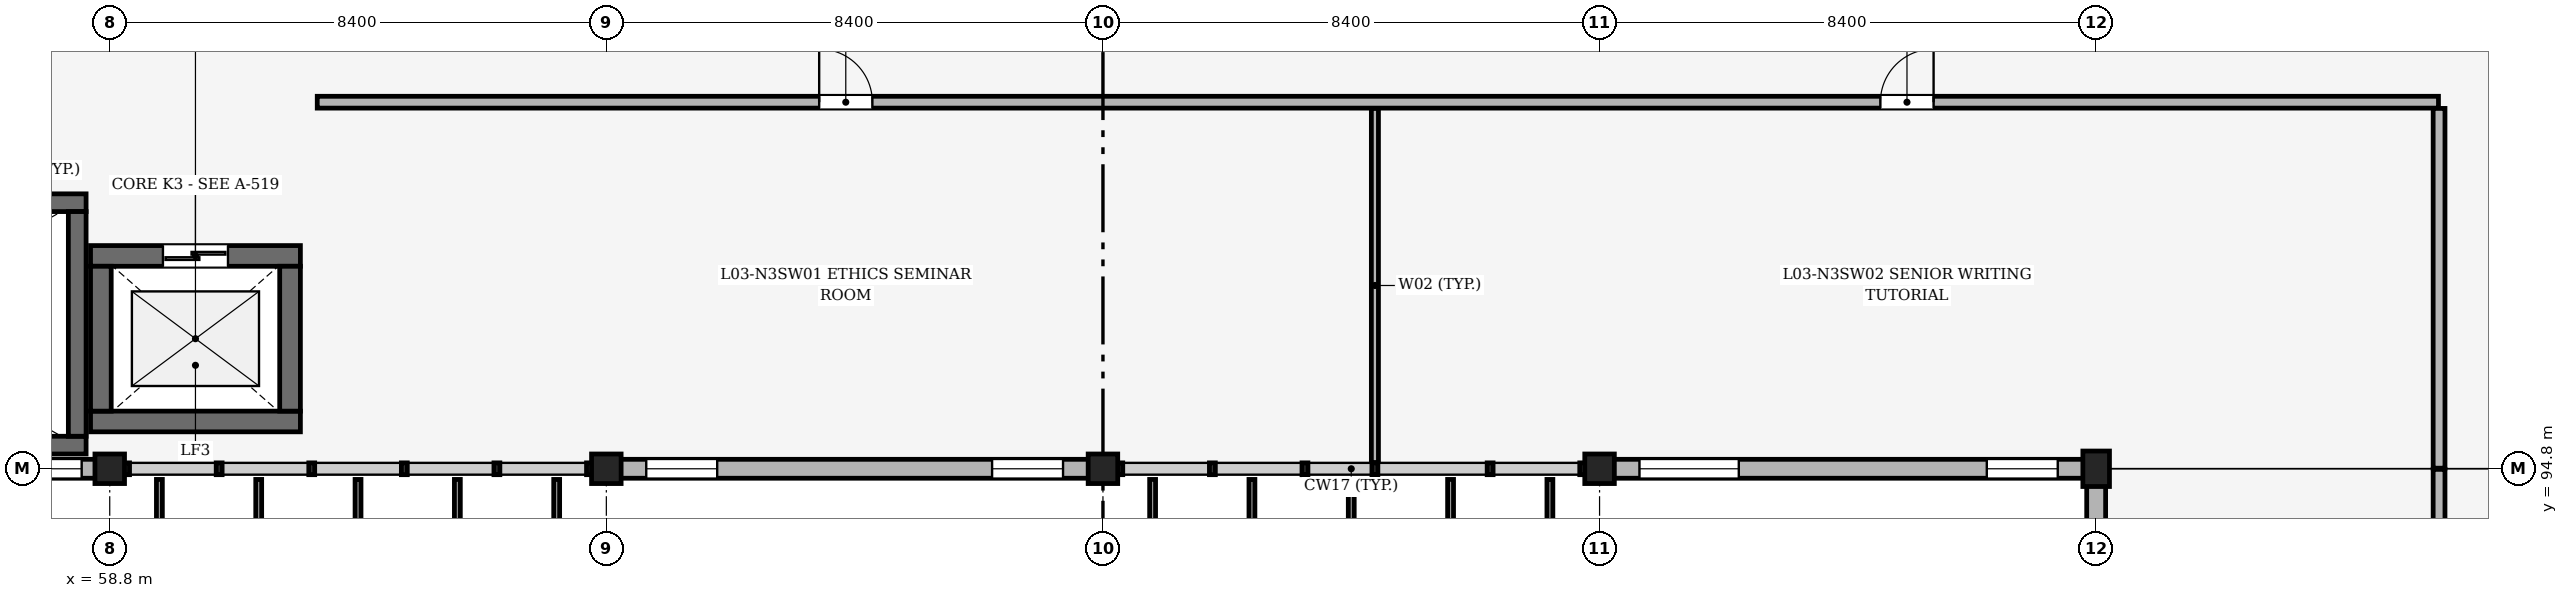
"""IFC4 building model, lengths in metres.
Left out: names, types, materials, properties, quantities, classifications, styles, units other than length and angle.
Written with IfcOpenShell. Run it as: python <this file> out.ifc"""

import sys

from ifc_helpers import new_model, si_unit, direction, frame, frame_2d, origin, origin_2d, place, context, subcontext, project, spatial, rectangle, extrude, element, fill, save


model = new_model("IFC4")
c1 = context("Model", 3, precision=1e-05, world=origin(), true_north=direction((0.0, 1.0)))
c2 = subcontext(c1, "Body", "Model", "MODEL_VIEW")
j1 = project(units=[si_unit("LENGTHUNIT", "METRE"), si_unit("PLANEANGLEUNIT", "RADIAN")], contexts=[c1])
p1 = place(None, origin())
s1 = spatial("IfcSite", under=j1, at=p1, CompositionType="ELEMENT")
p2 = place(p1, origin())
s2 = spatial("IfcBuilding", under=s1, at=p2, CompositionType="ELEMENT")
p3 = place(p2, frame((0.0, 0.0, 13.2)))
s3 = spatial("IfcBuildingStorey", under=s2, at=p3, CompositionType="ELEMENT", Elevation=13.2)
for number, where, z_axis, x_axis in (
    (1, (58.8, 94.8, 0.0), (0.0, 0.0, 1.0), (1.0, 0.0, 0.0)),
    (2, (67.2, 94.8, 0.0), (0.0, 0.0, 1.0), (1.0, 0.0, 0.0)),
    (3, (75.6, 94.8, 0.0), (0.0, 0.0, 1.0), (1.0, 0.0, 0.0)),
    (4, (84.0, 94.8, 0.0), (0.0, 0.0, 1.0), (1.0, 0.0, 0.0)),
):
    element("IfcColumn", number, at=place(p3, frame(where, z_axis=z_axis, x_axis=x_axis)), inside=s3, PredefinedType="COLUMN", context=c2, shape_type="SweptSolid", body=[
        extrude(rectangle(XDim=0.5, YDim=0.5, at=origin_2d()), origin(), (0.0, 0.0, 1.0), 4.2),
    ])
p4 = place(p3, frame((92.4, 94.8, 0.0), z_axis=(0.0, 0.0, 1.0), x_axis=(1.0, 0.0, 0.0)))
e5 = element("IfcColumn", 5, at=p4, inside=s3, PredefinedType="COLUMN", context=c2, shape_type="SweptSolid", body=[
    extrude(rectangle(XDim=0.45, YDim=0.6, at=origin_2d()), origin(), (0.0, 0.0, 1.0), 4.2),
])
p5 = place(p3, frame((50.625, 94.8, 0.0), z_axis=(0.0, 0.0, 1.0), x_axis=(1.0, 0.0, 0.0)))
e6 = element("IfcWall", 6, at=p5, inside=s3, PredefinedType="SOLIDWALL", context=c2, shape_type="SweptSolid", body=[
    extrude(rectangle(XDim=7.95, YDim=0.32, at=frame_2d((3.975, 0.0))), origin(), (0.0, 0.0, 1.0), 3.06),
])
p6 = place(p5, frame((0.45, 0.0, 0.9)))
e7 = element("IfcOpeningElement", 7, at=p6, cuts=e6, PredefinedType="OPENING", context=c2, shape_type="SweptSolid", body=[
    extrude(rectangle(XDim=1.2, YDim=1.8, at=frame_2d((0.6, 0.9))), frame((0.0, 0.17, 0.0), z_axis=(0.0, -1.0, 0.0), x_axis=(1.0, 0.0, 0.0)), (0.0, 0.0, 1.0), 0.34),
])
p7 = place(p5, frame((6.02, 0.0, 0.9)))
e8 = element("IfcOpeningElement", 8, at=p7, cuts=e6, PredefinedType="OPENING", context=c2, shape_type="SweptSolid", body=[
    extrude(rectangle(XDim=1.68, YDim=2.01, at=frame_2d((0.84, 1.005))), frame((0.0, 0.17, 0.0), z_axis=(0.0, -1.0, 0.0), x_axis=(1.0, 0.0, 0.0)), (0.0, 0.0, 1.0), 0.34),
])
p8 = place(p3, frame((67.425, 94.8, 0.0), z_axis=(0.0, 0.0, 1.0), x_axis=(1.0, 0.0, 0.0)))
e9 = element("IfcWall", 9, at=p8, inside=s3, PredefinedType="SOLIDWALL", context=c2, shape_type="SweptSolid", body=[
    extrude(rectangle(XDim=7.95, YDim=0.32, at=frame_2d((3.975, 0.0))), origin(), (0.0, 0.0, 1.0), 3.01),
])
p9 = place(p8, frame((0.45, 0.0, 0.9)))
e10 = element("IfcOpeningElement", 10, at=p9, cuts=e9, PredefinedType="OPENING", context=c2, shape_type="SweptSolid", body=[
    extrude(rectangle(XDim=1.2, YDim=1.5, at=frame_2d((0.6, 0.75))), frame((0.0, 0.17, 0.0), z_axis=(0.0, -1.0, 0.0), x_axis=(1.0, 0.0, 0.0)), (0.0, 0.0, 1.0), 0.34),
])
p10 = place(p8, frame((6.3, 0.0, 0.9)))
e11 = element("IfcOpeningElement", 11, at=p10, cuts=e9, PredefinedType="OPENING", context=c2, shape_type="SweptSolid", body=[
    extrude(rectangle(XDim=1.2, YDim=1.8, at=frame_2d((0.6, 0.9))), frame((0.0, 0.17, 0.0), z_axis=(0.0, -1.0, 0.0), x_axis=(1.0, 0.0, 0.0)), (0.0, 0.0, 1.0), 0.34),
])
p11 = place(p3, frame((84.225, 94.8, 0.0), z_axis=(0.0, 0.0, 1.0), x_axis=(1.0, 0.0, 0.0)))
e12 = element("IfcWall", 12, at=p11, inside=s3, PredefinedType="SOLIDWALL", context=c2, shape_type="SweptSolid", body=[
    extrude(rectangle(XDim=7.975, YDim=0.32, at=frame_2d((3.987, 0.0))), origin(), (0.0, 0.0, 1.0), 3.48),
])
p12 = place(p11, frame((0.45, 0.0, 0.9)))
e13 = element("IfcOpeningElement", 13, at=p12, cuts=e12, PredefinedType="OPENING", context=c2, shape_type="SweptSolid", body=[
    extrude(rectangle(XDim=1.68, YDim=2.4, at=frame_2d((0.84, 1.2))), frame((0.0, 0.17, 0.0), z_axis=(0.0, -1.0, 0.0), x_axis=(1.0, 0.0, 0.0)), (0.0, 0.0, 1.0), 0.34),
])
p13 = place(p11, frame((6.325, 0.0, 0.9)))
e14 = element("IfcOpeningElement", 14, at=p13, cuts=e12, PredefinedType="OPENING", context=c2, shape_type="SweptSolid", body=[
    extrude(rectangle(XDim=1.2, YDim=1.5, at=frame_2d((0.6, 0.75))), frame((0.0, 0.17, 0.0), z_axis=(0.0, -1.0, 0.0), x_axis=(1.0, 0.0, 0.0)), (0.0, 0.0, 1.0), 0.34),
])
p14 = place(p3, frame((92.4, 86.075, 0.0), z_axis=(0.0, 0.0, 1.0), x_axis=(0.0, 1.0, 0.0)))
e15 = element("IfcWall", 15, at=p14, inside=s3, PredefinedType="SOLIDWALL", context=c2, shape_type="SweptSolid", body=[
    extrude(rectangle(XDim=8.45, YDim=0.32, at=frame_2d((4.225, 0.0))), origin(), (0.0, 0.0, 1.0), 3.48),
])
p15 = place(p14, frame((3.025, 0.0, 0.9)))
e16 = element("IfcOpeningElement", 16, at=p15, cuts=e15, PredefinedType="OPENING", context=c2, shape_type="SweptSolid", body=[
    extrude(rectangle(XDim=2.4, YDim=1.8, at=frame_2d((1.2, 0.9))), frame((0.0, 0.17, 0.0), z_axis=(0.0, -1.0, 0.0), x_axis=(1.0, 0.0, 0.0)), (0.0, 0.0, 1.0), 0.34),
])
for number, where, z_axis, x_axis in (
    (17, (50.8, 95.2, 0.0), (0.0, 0.0, 1.0), (1.0, 0.0, 0.0)),
    (18, (50.8, 99.3, 0.0), (0.0, 0.0, 1.0), (1.0, 0.0, 0.0)),
):
    element("IfcWall", number, at=place(p3, frame(where, z_axis=z_axis, x_axis=x_axis)), inside=s3, PredefinedType="SHEAR", context=c2, shape_type="SweptSolid", body=[
        extrude(rectangle(XDim=7.6, YDim=0.3, at=frame_2d((3.8, 0.0))), origin(), (0.0, 0.0, 1.0), 4.025),
    ])
p16 = place(p3, frame((58.25, 95.35, 0.0), z_axis=(0.0, 0.0, 1.0), x_axis=(0.0, 1.0, 0.0)))
e19 = element("IfcWall", 19, at=p16, inside=s3, PredefinedType="SHEAR", context=c2, shape_type="SweptSolid", body=[
    extrude(rectangle(XDim=3.8, YDim=0.3, at=frame_2d((1.9, 0.0))), origin(), (0.0, 0.0, 1.0), 4.025),
])
p17 = place(p3, frame((58.475, 95.6, 0.0), z_axis=(0.0, 0.0, 1.0), x_axis=(1.0, 0.0, 0.0)))
e20 = element("IfcWall", 20, at=p17, inside=s3, PredefinedType="SHEAR", context=c2, shape_type="SweptSolid", body=[
    extrude(rectangle(XDim=3.55, YDim=0.35, at=frame_2d((1.775, 0.0))), origin(), (0.0, 0.0, 1.0), 3.92),
])
p18 = place(p3, frame((58.475, 98.4, 0.0), z_axis=(0.0, 0.0, 1.0), x_axis=(1.0, 0.0, 0.0)))
e21 = element("IfcWall", 21, at=p18, inside=s3, PredefinedType="SHEAR", context=c2, shape_type="SweptSolid", body=[
    extrude(rectangle(XDim=3.55, YDim=0.35, at=frame_2d((1.775, 0.0))), origin(), (0.0, 0.0, 1.0), 3.92),
])
p19 = place(p18, frame((1.225, 0.0, 0.0)))
e22 = element("IfcOpeningElement", 22, at=p19, cuts=e21, PredefinedType="OPENING", context=c2, shape_type="SweptSolid", body=[
    extrude(rectangle(XDim=1.1, YDim=2.2, at=frame_2d((0.55, 1.1))), frame((0.0, 0.185, 0.0), z_axis=(0.0, -1.0, 0.0), x_axis=(1.0, 0.0, 0.0)), (0.0, 0.0, 1.0), 0.37),
])
for number, where, z_axis, x_axis in (
    (23, (58.65, 95.775, 0.0), (0.0, 0.0, 1.0), (0.0, 1.0, 0.0)),
    (24, (61.85, 95.775, 0.0), (0.0, 0.0, 1.0), (0.0, 1.0, 0.0)),
):
    element("IfcWall", number, at=place(p3, frame(where, z_axis=z_axis, x_axis=x_axis)), inside=s3, PredefinedType="SHEAR", context=c2, shape_type="SweptSolid", body=[
        extrude(rectangle(XDim=2.45, YDim=0.35, at=frame_2d((1.225, 0.0))), origin(), (0.0, 0.0, 1.0), 3.92),
    ])
p20 = place(p3, frame((80.2, 94.905, 0.0), z_axis=(0.0, 0.0, 1.0), x_axis=(0.0, 1.0, 0.0)))
e25 = element("IfcWall", 25, at=p20, inside=s3, PredefinedType="PARTITIONING", context=c2, shape_type="SweptSolid", body=[
    extrude(rectangle(XDim=5.99, YDim=0.12, at=frame_2d((2.995, 0.0))), origin(), (0.0, 0.0, 1.0), 3.9),
])
p21 = place(p3, frame((62.31, 101.0, 0.0), z_axis=(0.0, 0.0, 1.0), x_axis=(1.0, 0.0, 0.0)))
e26 = element("IfcWall", 26, at=p21, inside=s3, PredefinedType="PARTITIONING", context=c2, shape_type="SweptSolid", body=[
    extrude(rectangle(XDim=35.88, YDim=0.2, at=frame_2d((17.94, 0.0))), origin(), (0.0, 0.0, 1.0), 3.451),
])
p22 = place(p21, frame((8.49, 0.0, 0.0)))
e27 = element("IfcOpeningElement", 27, at=p22, cuts=e26, PredefinedType="OPENING", context=c2, shape_type="SweptSolid", body=[
    extrude(rectangle(XDim=0.9, YDim=2.1, at=frame_2d((0.45, 1.05))), frame((0.0, 0.11, 0.0), z_axis=(0.0, -1.0, 0.0), x_axis=(1.0, 0.0, 0.0)), (0.0, 0.0, 1.0), 0.22),
])
p23 = place(p21, frame((26.44, 0.0, 0.0)))
e28 = element("IfcOpeningElement", 28, at=p23, cuts=e26, PredefinedType="OPENING", context=c2, shape_type="SweptSolid", body=[
    extrude(rectangle(XDim=0.9, YDim=2.1, at=frame_2d((0.45, 1.05))), frame((0.0, 0.11, 0.0), z_axis=(0.0, -1.0, 0.0), x_axis=(1.0, 0.0, 0.0)), (0.0, 0.0, 1.0), 0.22),
])
p24 = place(p3, frame((98.2, 94.81, 0.0), z_axis=(0.0, 0.0, 1.0), x_axis=(0.0, 1.0, 0.0)))
e29 = element("IfcWall", 29, at=p24, inside=s3, PredefinedType="PARTITIONING", context=c2, shape_type="SweptSolid", body=[
    extrude(rectangle(XDim=6.085, YDim=0.2, at=frame_2d((3.042, 0.0))), origin(), (0.0, 0.0, 1.0), 3.9),
])
p25 = place(p3, frame((98.2, 85.81, 0.0), z_axis=(0.0, 0.0, 1.0), x_axis=(0.0, 1.0, 0.0)))
e30 = element("IfcWall", 30, at=p25, inside=s3, PredefinedType="PARTITIONING", context=c2, shape_type="SweptSolid", body=[
    extrude(rectangle(XDim=8.98, YDim=0.2, at=frame_2d((4.49, 0.0))), origin(), (0.0, 0.0, 1.0), 3.9),
])
p26 = place(p25, frame((3.99, 0.0, 0.0)))
e31 = element("IfcOpeningElement", 31, at=p26, cuts=e30, PredefinedType="OPENING", context=c2, shape_type="SweptSolid", body=[
    extrude(rectangle(XDim=1.0, YDim=2.15, at=frame_2d((0.5, 1.075))), frame((0.0, 0.11, 0.0), z_axis=(0.0, -1.0, 0.0), x_axis=(1.0, 0.0, 0.0)), (0.0, 0.0, 1.0), 0.22),
])
p27 = place(p7, origin())
e32 = element("IfcWindow", 32, at=p27, inside=s3, PartitioningType="SINGLE_PANEL", PredefinedType="WINDOW", context=c2, shape_type="SweptSolid", body=[
    extrude(rectangle(XDim=1.68, YDim=2.01, at=frame_2d((0.84, 1.005))), frame((0.0, 0.03, 0.0), z_axis=(0.0, -1.0, 0.0), x_axis=(1.0, 0.0, 0.0)), (0.0, 0.0, 1.0), 0.06),
])
fill(e8, e32)
p28 = place(p9, origin())
e33 = element("IfcWindow", 33, at=p28, inside=s3, PartitioningType="SINGLE_PANEL", PredefinedType="WINDOW", context=c2, shape_type="SweptSolid", body=[
    extrude(rectangle(XDim=1.2, YDim=1.5, at=frame_2d((0.6, 0.75))), frame((0.0, 0.03, 0.0), z_axis=(0.0, -1.0, 0.0), x_axis=(1.0, 0.0, 0.0)), (0.0, 0.0, 1.0), 0.06),
])
fill(e10, e33)
p29 = place(p10, origin())
e34 = element("IfcWindow", 34, at=p29, inside=s3, PartitioningType="SINGLE_PANEL", PredefinedType="WINDOW", context=c2, shape_type="SweptSolid", body=[
    extrude(rectangle(XDim=1.2, YDim=1.8, at=frame_2d((0.6, 0.9))), frame((0.0, 0.03, 0.0), z_axis=(0.0, -1.0, 0.0), x_axis=(1.0, 0.0, 0.0)), (0.0, 0.0, 1.0), 0.06),
])
fill(e11, e34)
p30 = place(p12, origin())
e35 = element("IfcWindow", 35, at=p30, inside=s3, PartitioningType="SINGLE_PANEL", PredefinedType="WINDOW", context=c2, shape_type="SweptSolid", body=[
    extrude(rectangle(XDim=1.68, YDim=2.4, at=frame_2d((0.84, 1.2))), frame((0.0, 0.03, 0.0), z_axis=(0.0, -1.0, 0.0), x_axis=(1.0, 0.0, 0.0)), (0.0, 0.0, 1.0), 0.06),
])
fill(e13, e35)
p31 = place(p13, origin())
e36 = element("IfcWindow", 36, at=p31, inside=s3, PartitioningType="SINGLE_PANEL", PredefinedType="WINDOW", context=c2, shape_type="SweptSolid", body=[
    extrude(rectangle(XDim=1.2, YDim=1.5, at=frame_2d((0.6, 0.75))), frame((0.0, 0.03, 0.0), z_axis=(0.0, -1.0, 0.0), x_axis=(1.0, 0.0, 0.0)), (0.0, 0.0, 1.0), 0.06),
])
fill(e14, e36)
p32 = place(p19, origin())
e37 = element("IfcDoor", 37, at=p32, inside=s3, OperationType="DOUBLE_DOOR_SLIDING", PredefinedType="DOOR", context=c2, shape_type="SweptSolid", body=[
    extrude(rectangle(XDim=1.1, YDim=2.2, at=frame_2d((0.55, 1.1))), frame((0.0, 0.025, 0.0), z_axis=(0.0, -1.0, 0.0), x_axis=(1.0, 0.0, 0.0)), (0.0, 0.0, 1.0), 0.05),
])
fill(e22, e37)
p33 = place(p22, origin())
e38 = element("IfcDoor", 38, at=p33, inside=s3, OperationType="SINGLE_SWING_LEFT", PredefinedType="DOOR", context=c2, shape_type="SweptSolid", body=[
    extrude(rectangle(XDim=0.9, YDim=2.1, at=frame_2d((0.45, 1.05))), frame((0.0, 0.025, 0.0), z_axis=(0.0, -1.0, 0.0), x_axis=(1.0, 0.0, 0.0)), (0.0, 0.0, 1.0), 0.05),
])
fill(e27, e38)
p34 = place(p23, origin())
e39 = element("IfcDoor", 39, at=p34, inside=s3, OperationType="SINGLE_SWING_RIGHT", PredefinedType="DOOR", context=c2, shape_type="SweptSolid", body=[
    extrude(rectangle(XDim=0.9, YDim=2.1, at=frame_2d((0.45, 1.05))), frame((0.0, 0.025, 0.0), z_axis=(0.0, -1.0, 0.0), x_axis=(1.0, 0.0, 0.0)), (0.0, 0.0, 1.0), 0.05),
])
fill(e28, e39)
save(model, sys.argv[1])
